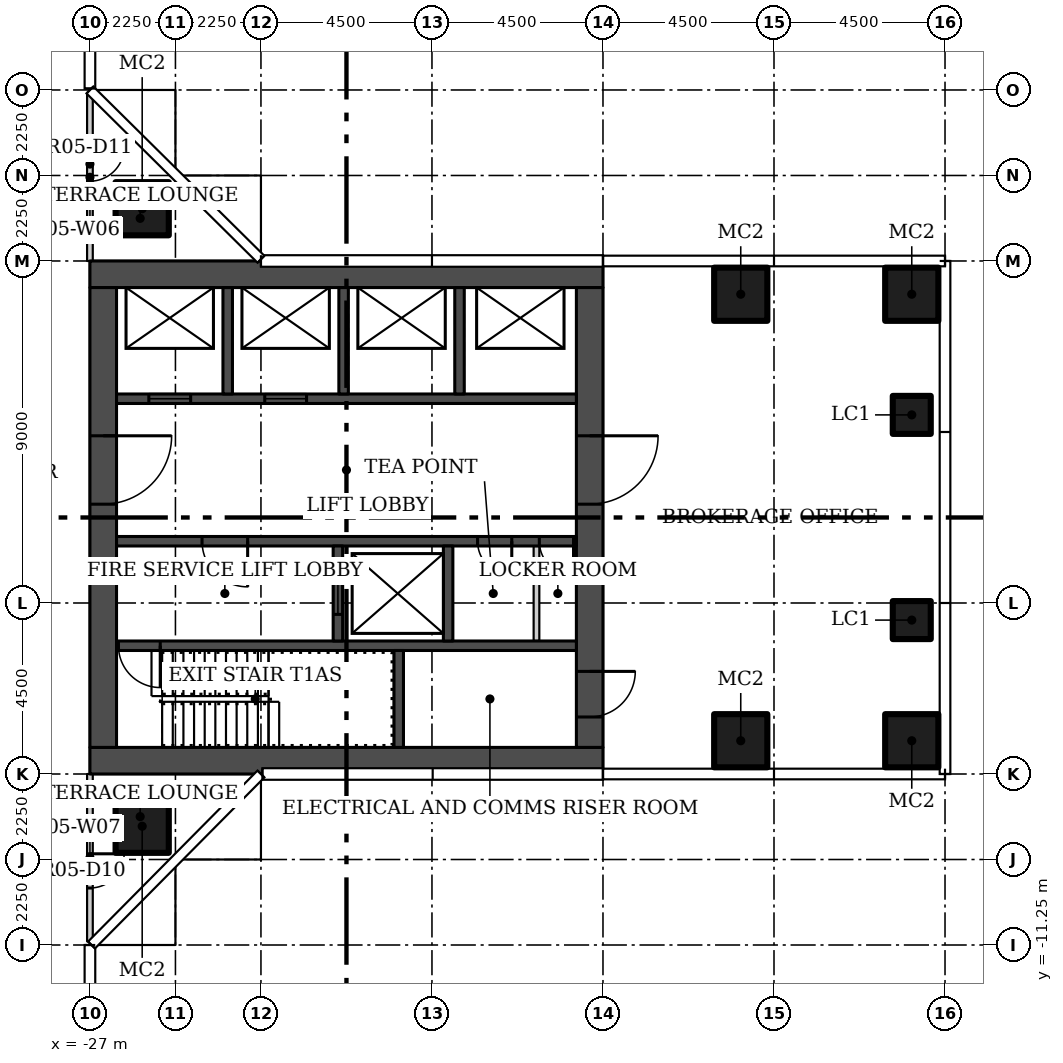
"""IFC4 building model, lengths in metres.
Left out: names, types, materials, properties, quantities, classifications, styles, units other than length and angle.
Written with IfcOpenShell. Run it as: python <this file> out.ifc"""

import sys

from ifc_helpers import new_model, si_unit, direction, frame, frame_2d, origin, origin_2d, place, context, subcontext, project, spatial, rectangle, hollow_rectangle, extrude, element, fill, save


model = new_model("IFC4")
c1 = context("Model", 3, precision=1e-05, world=origin(), true_north=direction((0.0, 1.0)))
c2 = subcontext(c1, "Body", "Model", "MODEL_VIEW")
j1 = project(units=[si_unit("LENGTHUNIT", "METRE"), si_unit("PLANEANGLEUNIT", "RADIAN")], contexts=[c1])
p1 = place(None, origin())
s1 = spatial("IfcSite", under=j1, at=p1, CompositionType="ELEMENT")
p2 = place(p1, origin())
s2 = spatial("IfcBuilding", under=s1, at=p2, CompositionType="ELEMENT")
p3 = place(p2, frame((0.0, 0.0, 57.6)))
s3 = spatial("IfcBuildingStorey", under=s2, at=p3, CompositionType="ELEMENT", Elevation=57.6)
for number, where in (
    (1, (-25.625, 8.125, 0.0)),
    (2, (-25.625, -8.125, 0.0)),
    (3, (-9.875, -5.875, 0.0)),
    (4, (-5.375, -5.875, 0.0)),
    (5, (-9.875, 5.875, 0.0)),
    (6, (-5.375, 5.875, 0.0)),
):
    element("IfcColumn", number, at=place(p3, frame(where)), inside=s3, PredefinedType="COLUMN", context=c2, shape_type="SweptSolid", body=[
        extrude(hollow_rectangle(XDim=1.4, YDim=1.4, WallThickness=0.05, at=origin_2d()), origin(), (0.0, 0.0, 1.0), 3.55),
    ])
for number, where in (
    (7, (-5.375, -2.7, 0.0)),
    (8, (-5.375, 2.7, 0.0)),
):
    element("IfcColumn", number, at=place(p3, frame(where)), inside=s3, PredefinedType="COLUMN", context=c2, shape_type="SweptSolid", body=[
        extrude(hollow_rectangle(XDim=1.0, YDim=1.0, WallThickness=0.04, at=origin_2d()), origin(), (0.0, 0.0, 1.0), 3.55),
    ])
p4 = place(p3, frame((-27.0, 11.155, 0.0), z_axis=(0.0, 0.0, 1.0), x_axis=(0.0, -1.0, 0.0)))
e9 = element("IfcWall", 9, at=p4, inside=s3, PredefinedType="PARTITIONING", context=c2, shape_type="SweptSolid", body=[
    extrude(rectangle(XDim=4.405, YDim=0.15, at=frame_2d((2.203, 0.0))), origin(), (0.0, 0.0, 1.0), 3.55),
])
p5 = place(p4, frame((1.405, 0.0, 0.0)))
e10 = element("IfcOpeningElement", 10, at=p5, cuts=e9, PredefinedType="OPENING", context=c2, shape_type="SweptSolid", body=[
    extrude(rectangle(XDim=0.9, YDim=2.1, at=frame_2d((0.45, 1.05))), frame((0.0, 0.085, 0.0), z_axis=(0.0, -1.0, 0.0), x_axis=(1.0, 0.0, 0.0)), (0.0, 0.0, 1.0), 0.17),
])
p6 = place(p3, frame((-27.0, -6.75, 0.0), z_axis=(0.0, 0.0, 1.0), x_axis=(0.0, -1.0, 0.0)))
e11 = element("IfcWall", 11, at=p6, inside=s3, PredefinedType="PARTITIONING", context=c2, shape_type="SweptSolid", body=[
    extrude(rectangle(XDim=4.405, YDim=0.15, at=frame_2d((2.203, 0.0))), origin(), (0.0, 0.0, 1.0), 3.55),
])
p7 = place(p6, frame((2.1, 0.0, 0.0)))
e12 = element("IfcOpeningElement", 12, at=p7, cuts=e11, PredefinedType="OPENING", context=c2, shape_type="SweptSolid", body=[
    extrude(rectangle(XDim=0.9, YDim=2.1, at=frame_2d((0.45, 1.05))), frame((0.0, 0.085, 0.0), z_axis=(0.0, -1.0, 0.0), x_axis=(1.0, 0.0, 0.0)), (0.0, 0.0, 1.0), 0.17),
])
for number, where in (
    (13, (-27.0, -6.4, 0.0)),
    (14, (-27.0, 6.4, 0.0)),
):
    element("IfcWall", number, at=place(p3, frame(where)), inside=s3, PredefinedType="SHEAR", context=c2, shape_type="SweptSolid", body=[
        extrude(rectangle(XDim=13.5, YDim=0.7, at=frame_2d((6.75, 0.0))), origin(), (0.0, 0.0, 1.0), 3.55),
    ])
p8 = place(p3, frame((-26.65, 6.05, 0.0), z_axis=(0.0, 0.0, 1.0), x_axis=(0.0, -1.0, 0.0)))
e15 = element("IfcWall", 15, at=p8, inside=s3, PredefinedType="SHEAR", context=c2, shape_type="SweptSolid", body=[
    extrude(rectangle(XDim=12.1, YDim=0.7, at=frame_2d((6.05, 0.0))), origin(), (0.0, 0.0, 1.0), 3.55),
])
p9 = place(p8, frame((3.9, 0.0, 0.0)))
e16 = element("IfcOpeningElement", 16, at=p9, cuts=e15, PredefinedType="OPENING", context=c2, shape_type="SweptSolid", body=[
    extrude(rectangle(XDim=1.8, YDim=2.4, at=frame_2d((0.9, 1.2))), frame((0.0, 0.36, 0.0), z_axis=(0.0, -1.0, 0.0), x_axis=(1.0, 0.0, 0.0)), (0.0, 0.0, 1.0), 0.72),
])
p10 = place(p3, frame((-13.85, 6.05, 0.0), z_axis=(0.0, 0.0, 1.0), x_axis=(0.0, -1.0, 0.0)))
e17 = element("IfcWall", 17, at=p10, inside=s3, PredefinedType="SHEAR", context=c2, shape_type="SweptSolid", body=[
    extrude(rectangle(XDim=12.1, YDim=0.7, at=frame_2d((6.05, 0.0))), origin(), (0.0, 0.0, 1.0), 3.55),
])
p11 = place(p10, frame((10.1, 0.0, 0.0)))
e18 = element("IfcOpeningElement", 18, at=p11, cuts=e17, PredefinedType="OPENING", context=c2, shape_type="SweptSolid", body=[
    extrude(rectangle(XDim=1.2, YDim=2.1, at=frame_2d((0.6, 1.05))), frame((0.0, 0.36, 0.0), z_axis=(0.0, -1.0, 0.0), x_axis=(1.0, 0.0, 0.0)), (0.0, 0.0, 1.0), 0.72),
])
p12 = place(p10, frame((3.9, 0.0, 0.0)))
e19 = element("IfcOpeningElement", 19, at=p12, cuts=e17, PredefinedType="OPENING", context=c2, shape_type="SweptSolid", body=[
    extrude(rectangle(XDim=1.8, YDim=2.4, at=frame_2d((0.9, 1.2))), frame((0.0, 0.36, 0.0), z_axis=(0.0, -1.0, 0.0), x_axis=(1.0, 0.0, 0.0)), (0.0, 0.0, 1.0), 0.72),
])
p13 = place(p3, frame((-14.2, -3.375, 0.0), z_axis=(0.0, 0.0, 1.0), x_axis=(-1.0, 0.0, 0.0)))
e20 = element("IfcWall", 20, at=p13, inside=s3, PredefinedType="SHEAR", context=c2, shape_type="SweptSolid", body=[
    extrude(rectangle(XDim=12.1, YDim=0.25, at=frame_2d((6.05, 0.0))), origin(), (0.0, 0.0, 1.0), 3.55),
])
p14 = place(p13, frame((10.95, 0.0, 0.0)))
e21 = element("IfcOpeningElement", 21, at=p14, cuts=e20, PredefinedType="OPENING", context=c2, shape_type="SweptSolid", body=[
    extrude(rectangle(XDim=1.1, YDim=2.1, at=frame_2d((0.55, 1.05))), frame((0.0, 0.135, 0.0), z_axis=(0.0, -1.0, 0.0), x_axis=(1.0, 0.0, 0.0)), (0.0, 0.0, 1.0), 0.27),
])
p15 = place(p3, frame((-18.875, -6.05, 0.0), z_axis=(0.0, 0.0, 1.0), x_axis=(0.0, 1.0, 0.0)))
e22 = element("IfcWall", 22, at=p15, inside=s3, PredefinedType="SHEAR", context=c2, shape_type="SweptSolid", body=[
    extrude(rectangle(XDim=2.55, YDim=0.25, at=frame_2d((1.275, 0.0))), origin(), (0.0, 0.0, 1.0), 3.55),
])
p16 = place(p3, frame((-14.2, -0.625, 0.0), z_axis=(0.0, 0.0, 1.0), x_axis=(-1.0, 0.0, 0.0)))
e23 = element("IfcWall", 23, at=p16, inside=s3, PredefinedType="SHEAR", context=c2, shape_type="SweptSolid", body=[
    extrude(rectangle(XDim=12.1, YDim=0.25, at=frame_2d((6.05, 0.0))), origin(), (0.0, 0.0, 1.0), 3.55),
])
p17 = place(p16, frame((8.65, 0.0, 0.0)))
e24 = element("IfcOpeningElement", 24, at=p17, cuts=e23, PredefinedType="OPENING", context=c2, shape_type="SweptSolid", body=[
    extrude(rectangle(XDim=1.2, YDim=2.1, at=frame_2d((0.6, 1.05))), frame((0.0, 0.135, 0.0), z_axis=(0.0, -1.0, 0.0), x_axis=(1.0, 0.0, 0.0)), (0.0, 0.0, 1.0), 0.27),
])
p18 = place(p16, frame((1.7, 0.0, 0.0)))
e25 = element("IfcOpeningElement", 25, at=p18, cuts=e23, PredefinedType="OPENING", context=c2, shape_type="SweptSolid", body=[
    extrude(rectangle(XDim=0.9, YDim=2.1, at=frame_2d((0.45, 1.05))), frame((0.0, 0.135, 0.0), z_axis=(0.0, -1.0, 0.0), x_axis=(1.0, 0.0, 0.0)), (0.0, 0.0, 1.0), 0.27),
])
p19 = place(p16, frame((0.075, 0.0, 0.0)))
e26 = element("IfcOpeningElement", 26, at=p19, cuts=e23, PredefinedType="OPENING", context=c2, shape_type="SweptSolid", body=[
    extrude(rectangle(XDim=0.9, YDim=2.1, at=frame_2d((0.45, 1.05))), frame((0.0, 0.135, 0.0), z_axis=(0.0, -1.0, 0.0), x_axis=(1.0, 0.0, 0.0)), (0.0, 0.0, 1.0), 0.27),
])
p20 = place(p3, frame((-20.475, -3.25, 0.0), z_axis=(0.0, 0.0, 1.0), x_axis=(0.0, 1.0, 0.0)))
e27 = element("IfcWall", 27, at=p20, inside=s3, PredefinedType="SHEAR", context=c2, shape_type="SweptSolid", body=[
    extrude(rectangle(XDim=2.5, YDim=0.25, at=frame_2d((1.25, 0.0))), origin(), (0.0, 0.0, 1.0), 3.55),
])
p21 = place(p20, frame((0.7, 0.0, 0.0)))
e28 = element("IfcOpeningElement", 28, at=p21, cuts=e27, PredefinedType="OPENING", context=c2, shape_type="SweptSolid", body=[
    extrude(rectangle(XDim=1.1, YDim=2.1, at=frame_2d((0.55, 1.05))), frame((0.0, 0.135, 0.0), z_axis=(0.0, -1.0, 0.0), x_axis=(1.0, 0.0, 0.0)), (0.0, 0.0, 1.0), 0.27),
])
p22 = place(p3, frame((-17.575, -3.25, 0.0), z_axis=(0.0, 0.0, 1.0), x_axis=(0.0, 1.0, 0.0)))
e29 = element("IfcWall", 29, at=p22, inside=s3, PredefinedType="SHEAR", context=c2, shape_type="SweptSolid", body=[
    extrude(rectangle(XDim=2.5, YDim=0.25, at=frame_2d((1.25, 0.0))), origin(), (0.0, 0.0, 1.0), 3.55),
])
p23 = place(p3, frame((-15.25, -3.25, 0.0), z_axis=(0.0, 0.0, 1.0), x_axis=(0.0, 1.0, 0.0)))
e30 = element("IfcWall", 30, at=p23, inside=s3, PredefinedType="PARTITIONING", context=c2, shape_type="SweptSolid", body=[
    extrude(rectangle(XDim=2.5, YDim=0.15, at=frame_2d((1.25, 0.0))), origin(), (0.0, 0.0, 1.0), 3.55),
])
p24 = place(p3, frame((-26.3, 3.125, 0.0)))
e31 = element("IfcWall", 31, at=p24, inside=s3, PredefinedType="SHEAR", context=c2, shape_type="SweptSolid", body=[
    extrude(rectangle(XDim=12.1, YDim=0.25, at=frame_2d((6.05, 0.0))), origin(), (0.0, 0.0, 1.0), 3.55),
])
p25 = place(p24, frame((0.85, 0.0, 0.0)))
e32 = element("IfcOpeningElement", 32, at=p25, cuts=e31, PredefinedType="OPENING", context=c2, shape_type="SweptSolid", body=[
    extrude(rectangle(XDim=1.1, YDim=2.1, at=frame_2d((0.55, 1.05))), frame((0.0, 0.135, 0.0), z_axis=(0.0, -1.0, 0.0), x_axis=(1.0, 0.0, 0.0)), (0.0, 0.0, 1.0), 0.27),
])
p26 = place(p24, frame((3.9, 0.0, 0.0)))
e33 = element("IfcOpeningElement", 33, at=p26, cuts=e31, PredefinedType="OPENING", context=c2, shape_type="SweptSolid", body=[
    extrude(rectangle(XDim=1.1, YDim=2.1, at=frame_2d((0.55, 1.05))), frame((0.0, 0.135, 0.0), z_axis=(0.0, -1.0, 0.0), x_axis=(1.0, 0.0, 0.0)), (0.0, 0.0, 1.0), 0.27),
])
for number, where, z_axis, x_axis in (
    (34, (-23.375, 3.25, 0.0), (0.0, 0.0, 1.0), (0.0, 1.0, 0.0)),
    (35, (-20.325, 3.25, 0.0), (0.0, 0.0, 1.0), (0.0, 1.0, 0.0)),
    (36, (-17.275, 3.25, 0.0), (0.0, 0.0, 1.0), (0.0, 1.0, 0.0)),
):
    element("IfcWall", number, at=place(p3, frame(where, z_axis=z_axis, x_axis=x_axis)), inside=s3, PredefinedType="SHEAR", context=c2, shape_type="SweptSolid", body=[
        extrude(rectangle(XDim=2.8, YDim=0.25, at=frame_2d((1.4, 0.0))), origin(), (0.0, 0.0, 1.0), 3.55),
    ])
p27 = place(p7, origin())
e37 = element("IfcDoor", 37, at=p27, inside=s3, OperationType="SINGLE_SWING_RIGHT", PredefinedType="DOOR", context=c2, shape_type="SweptSolid", body=[
    extrude(rectangle(XDim=0.9, YDim=2.1, at=frame_2d((0.45, 1.05))), frame((0.0, 0.025, 0.0), z_axis=(0.0, -1.0, 0.0), x_axis=(1.0, 0.0, 0.0)), (0.0, 0.0, 1.0), 0.05),
])
fill(e12, e37)
p28 = place(p5, origin())
e38 = element("IfcDoor", 38, at=p28, inside=s3, OperationType="SINGLE_SWING_LEFT", PredefinedType="DOOR", context=c2, shape_type="SweptSolid", body=[
    extrude(rectangle(XDim=0.9, YDim=2.1, at=frame_2d((0.45, 1.05))), frame((0.0, 0.025, 0.0), z_axis=(0.0, -1.0, 0.0), x_axis=(1.0, 0.0, 0.0)), (0.0, 0.0, 1.0), 0.05),
])
fill(e10, e38)
p29 = place(p9, origin())
e39 = element("IfcDoor", 39, at=p29, inside=s3, OperationType="DOUBLE_DOOR_SINGLE_SWING", PredefinedType="DOOR", context=c2, shape_type="SweptSolid", body=[
    extrude(rectangle(XDim=1.8, YDim=2.4, at=frame_2d((0.9, 1.2))), frame((0.0, 0.025, 0.0), z_axis=(0.0, -1.0, 0.0), x_axis=(1.0, 0.0, 0.0)), (0.0, 0.0, 1.0), 0.05),
])
fill(e16, e39)
p30 = place(p11, origin())
e40 = element("IfcDoor", 40, at=p30, inside=s3, OperationType="SINGLE_SWING_RIGHT", PredefinedType="DOOR", context=c2, shape_type="SweptSolid", body=[
    extrude(rectangle(XDim=1.2, YDim=2.1, at=frame_2d((0.6, 1.05))), frame((0.0, 0.025, 0.0), z_axis=(0.0, -1.0, 0.0), x_axis=(1.0, 0.0, 0.0)), (0.0, 0.0, 1.0), 0.05),
])
fill(e18, e40)
p31 = place(p12, origin())
e41 = element("IfcDoor", 41, at=p31, inside=s3, OperationType="DOUBLE_DOOR_SINGLE_SWING", PredefinedType="DOOR", context=c2, shape_type="SweptSolid", body=[
    extrude(rectangle(XDim=1.8, YDim=2.4, at=frame_2d((0.9, 1.2))), frame((0.0, 0.025, 0.0), z_axis=(0.0, -1.0, 0.0), x_axis=(1.0, 0.0, 0.0)), (0.0, 0.0, 1.0), 0.05),
])
fill(e19, e41)
p32 = place(p14, origin())
e42 = element("IfcDoor", 42, at=p32, inside=s3, OperationType="SINGLE_SWING_RIGHT", PredefinedType="DOOR", context=c2, shape_type="SweptSolid", body=[
    extrude(rectangle(XDim=1.1, YDim=2.1, at=frame_2d((0.55, 1.05))), frame((0.0, 0.025, 0.0), z_axis=(0.0, -1.0, 0.0), x_axis=(1.0, 0.0, 0.0)), (0.0, 0.0, 1.0), 0.05),
])
fill(e21, e42)
p33 = place(p17, origin())
e43 = element("IfcDoor", 43, at=p33, inside=s3, OperationType="SINGLE_SWING_RIGHT", PredefinedType="DOOR", context=c2, shape_type="SweptSolid", body=[
    extrude(rectangle(XDim=1.2, YDim=2.1, at=frame_2d((0.6, 1.05))), frame((0.0, 0.025, 0.0), z_axis=(0.0, -1.0, 0.0), x_axis=(1.0, 0.0, 0.0)), (0.0, 0.0, 1.0), 0.05),
])
fill(e24, e43)
p34 = place(p18, origin())
e44 = element("IfcDoor", 44, at=p34, inside=s3, OperationType="SINGLE_SWING_LEFT", PredefinedType="DOOR", context=c2, shape_type="SweptSolid", body=[
    extrude(rectangle(XDim=0.9, YDim=2.1, at=frame_2d((0.45, 1.05))), frame((0.0, 0.025, 0.0), z_axis=(0.0, -1.0, 0.0), x_axis=(1.0, 0.0, 0.0)), (0.0, 0.0, 1.0), 0.05),
])
fill(e25, e44)
p35 = place(p19, origin())
e45 = element("IfcDoor", 45, at=p35, inside=s3, OperationType="SINGLE_SWING_LEFT", PredefinedType="DOOR", context=c2, shape_type="SweptSolid", body=[
    extrude(rectangle(XDim=0.9, YDim=2.1, at=frame_2d((0.45, 1.05))), frame((0.0, 0.025, 0.0), z_axis=(0.0, -1.0, 0.0), x_axis=(1.0, 0.0, 0.0)), (0.0, 0.0, 1.0), 0.05),
])
fill(e26, e45)
p36 = place(p21, origin())
e46 = element("IfcDoor", 46, at=p36, inside=s3, OperationType="SLIDING_TO_LEFT", PredefinedType="DOOR", context=c2, shape_type="SweptSolid", body=[
    extrude(rectangle(XDim=1.1, YDim=2.1, at=frame_2d((0.55, 1.05))), frame((0.0, 0.025, 0.0), z_axis=(0.0, -1.0, 0.0), x_axis=(1.0, 0.0, 0.0)), (0.0, 0.0, 1.0), 0.05),
])
fill(e28, e46)
p37 = place(p25, origin())
e47 = element("IfcDoor", 47, at=p37, inside=s3, OperationType="SLIDING_TO_LEFT", PredefinedType="DOOR", context=c2, shape_type="SweptSolid", body=[
    extrude(rectangle(XDim=1.1, YDim=2.1, at=frame_2d((0.55, 1.05))), frame((0.0, 0.025, 0.0), z_axis=(0.0, -1.0, 0.0), x_axis=(1.0, 0.0, 0.0)), (0.0, 0.0, 1.0), 0.05),
])
fill(e32, e47)
p38 = place(p26, origin())
e48 = element("IfcDoor", 48, at=p38, inside=s3, OperationType="SLIDING_TO_LEFT", PredefinedType="DOOR", context=c2, shape_type="SweptSolid", body=[
    extrude(rectangle(XDim=1.1, YDim=2.1, at=frame_2d((0.55, 1.05))), frame((0.0, 0.025, 0.0), z_axis=(0.0, -1.0, 0.0), x_axis=(1.0, 0.0, 0.0)), (0.0, 0.0, 1.0), 0.05),
])
fill(e33, e48)
save(model, sys.argv[1])
